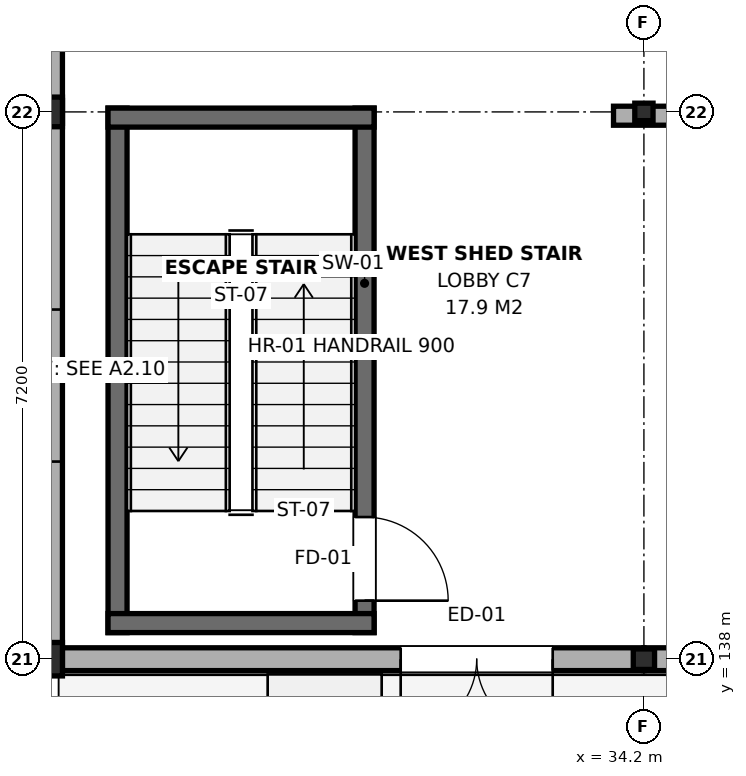
"""IFC4 building model, lengths in metres.
Left out: names, types, materials, properties, quantities, classifications, styles, units other than length and angle.
Written with IfcOpenShell. Run it as: python <this file> out.ifc"""

import sys

from ifc_helpers import new_model, si_unit, direction, frame, frame_2d, origin, origin_2d, place, context, subcontext, project, spatial, rectangle, i_section, extrude, element, fill, save


model = new_model("IFC4")
c1 = context("Model", 3, precision=1e-05, world=origin(), true_north=direction((0.0, 1.0)))
c2 = subcontext(c1, "Body", "Model", "MODEL_VIEW")
j1 = project(units=[si_unit("LENGTHUNIT", "METRE"), si_unit("PLANEANGLEUNIT", "RADIAN")], contexts=[c1])
p1 = place(None, origin())
s1 = spatial("IfcSite", under=j1, at=p1, CompositionType="ELEMENT")
p2 = place(p1, origin())
s2 = spatial("IfcBuilding", under=s1, at=p2, CompositionType="ELEMENT")
p3 = place(p2, origin())
s3 = spatial("IfcBuildingStorey", under=s2, at=p3, CompositionType="ELEMENT", Elevation=0.0)
p4 = place(p3, frame((26.4, 138.0, 0.0), z_axis=(0.0, 0.0, 1.0), x_axis=(1.0, 0.0, 0.0)))
e1 = element("IfcColumn", 1, at=p4, inside=s3, PredefinedType="COLUMN", context=c2, shape_type="SweptSolid", body=[
    extrude(i_section(OverallWidth=0.3, OverallDepth=0.44, WebThickness=0.011, FlangeThickness=0.021, FilletRadius=0.027, at=origin_2d()), origin(), (0.0, 0.0, 1.0), 4.56),
])
p5 = place(p3, frame((26.4, 145.2, 0.0), z_axis=(0.0, 0.0, 1.0), x_axis=(1.0, 0.0, 0.0)))
e2 = element("IfcColumn", 2, at=p5, inside=s3, PredefinedType="COLUMN", context=c2, shape_type="SweptSolid", body=[
    extrude(i_section(OverallWidth=0.3, OverallDepth=0.39, WebThickness=0.011, FlangeThickness=0.019, FilletRadius=0.027, at=origin_2d()), origin(), (0.0, 0.0, 1.0), 4.56),
])
p6 = place(p3, frame((34.2, 138.0, 0.0), z_axis=(0.0, 0.0, 1.0), x_axis=(1.0, 0.0, 0.0)))
e3 = element("IfcColumn", 3, at=p6, inside=s3, PredefinedType="COLUMN", context=c2, shape_type="SweptSolid", body=[
    extrude(i_section(OverallWidth=0.28, OverallDepth=0.27, WebThickness=0.008, FlangeThickness=0.013, FilletRadius=0.024, at=origin_2d()), origin(), (0.0, 0.0, 1.0), 4.56),
])
p7 = place(p3, frame((34.2, 145.2, 0.0), z_axis=(0.0, 0.0, 1.0), x_axis=(1.0, 0.0, 0.0)))
e4 = element("IfcColumn", 4, at=p7, inside=s3, PredefinedType="COLUMN", context=c2, shape_type="SweptSolid", body=[
    extrude(i_section(OverallWidth=0.24, OverallDepth=0.23, WebThickness=0.008, FlangeThickness=0.012, FilletRadius=0.021, at=origin_2d()), origin(), (0.0, 0.0, 1.0), 4.56),
])
p8 = place(p3, frame((26.25, 138.0, 0.0), z_axis=(0.0, 0.0, 1.0), x_axis=(1.0, 0.0, 0.0)))
e5 = element("IfcWall", 5, at=p8, inside=s3, PredefinedType="SOLIDWALL", context=c2, shape_type="SweptSolid", body=[
    extrude(rectangle(XDim=7.95, YDim=0.3, at=frame_2d((3.975, 0.0))), origin(), (0.0, 0.0, 1.0), 3.955),
])
p9 = place(p8, frame((4.75, 0.0, 0.0)))
e6 = element("IfcOpeningElement", 6, at=p9, cuts=e5, PredefinedType="OPENING", context=c2, shape_type="SweptSolid", body=[
    extrude(rectangle(XDim=2.0, YDim=2.25, at=frame_2d((1.0, 1.125))), frame((0.0, 0.165, 0.0), z_axis=(0.0, -1.0, 0.0), x_axis=(1.0, 0.0, 0.0)), (0.0, 0.0, 1.0), 0.33),
])
p10 = place(p3, frame((34.2, 138.0, 0.0), z_axis=(0.0, 0.0, 1.0), x_axis=(1.0, 0.0, 0.0)))
e7 = element("IfcWall", 7, at=p10, inside=s3, PredefinedType="SOLIDWALL", context=c2, shape_type="SweptSolid", body=[
    extrude(rectangle(XDim=6.0, YDim=0.3, at=frame_2d((3.0, 0.0))), origin(), (0.0, 0.0, 1.0), 3.955),
])
p11 = place(p10, frame((2.1, 0.0, 2.15)))
e8 = element("IfcOpeningElement", 8, at=p11, cuts=e7, PredefinedType="OPENING", context=c2, shape_type="SweptSolid", body=[
    extrude(rectangle(XDim=1.8, YDim=1.2, at=frame_2d((0.9, 0.6))), frame((0.0, 0.165, 0.0), z_axis=(0.0, -1.0, 0.0), x_axis=(1.0, 0.0, 0.0)), (0.0, 0.0, 1.0), 0.33),
])
p12 = place(p3, frame((26.4, 137.85, 0.0), z_axis=(0.0, 0.0, 1.0), x_axis=(0.0, 1.0, 0.0)))
e9 = element("IfcWall", 9, at=p12, inside=s3, PredefinedType="SOLIDWALL", context=c2, shape_type="SweptSolid", body=[
    extrude(rectangle(XDim=7.5, YDim=0.3, at=frame_2d((3.75, 0.0))), origin(), (0.0, 0.0, 1.0), 4.005),
])
p13 = place(p12, frame((2.75, 0.0, 1.1)))
e10 = element("IfcOpeningElement", 10, at=p13, cuts=e9, PredefinedType="OPENING", context=c2, shape_type="SweptSolid", body=[
    extrude(rectangle(XDim=2.0, YDim=1.8, at=frame_2d((1.0, 0.9))), frame((0.0, 0.165, 0.0), z_axis=(0.0, -1.0, 0.0), x_axis=(1.0, 0.0, 0.0)), (0.0, 0.0, 1.0), 0.33),
])
p14 = place(p3, frame((26.4, 145.05, 0.0), z_axis=(0.0, 0.0, 1.0), x_axis=(0.0, 1.0, 0.0)))
e11 = element("IfcWall", 11, at=p14, inside=s3, PredefinedType="SOLIDWALL", context=c2, shape_type="SweptSolid", body=[
    extrude(rectangle(XDim=7.35, YDim=0.3, at=frame_2d((3.675, 0.0))), origin(), (0.0, 0.0, 1.0), 4.005),
])
p15 = place(p14, frame((2.675, 0.0, 1.1)))
e12 = element("IfcOpeningElement", 12, at=p15, cuts=e11, PredefinedType="OPENING", context=c2, shape_type="SweptSolid", body=[
    extrude(rectangle(XDim=2.0, YDim=1.8, at=frame_2d((1.0, 0.9))), frame((0.0, 0.165, 0.0), z_axis=(0.0, -1.0, 0.0), x_axis=(1.0, 0.0, 0.0)), (0.0, 0.0, 1.0), 0.33),
])
p16 = place(p3, frame((27.275, 138.35, 0.0), z_axis=(0.0, 0.0, 1.0), x_axis=(0.0, 1.0, 0.0)))
e13 = element("IfcWall", 13, at=p16, inside=s3, PredefinedType="SHEAR", context=c2, shape_type="SweptSolid", body=[
    extrude(rectangle(XDim=6.9, YDim=0.25, at=frame_2d((3.45, 0.0))), origin(), (0.0, 0.0, 1.0), 4.56),
])
p17 = place(p3, frame((30.525, 138.35, 0.0), z_axis=(0.0, 0.0, 1.0), x_axis=(0.0, 1.0, 0.0)))
e14 = element("IfcWall", 14, at=p17, inside=s3, PredefinedType="SHEAR", context=c2, shape_type="SweptSolid", body=[
    extrude(rectangle(XDim=6.9, YDim=0.25, at=frame_2d((3.45, 0.0))), origin(), (0.0, 0.0, 1.0), 4.56),
])
p18 = place(p17, frame((0.42, 0.0, 0.0)))
e15 = element("IfcOpeningElement", 15, at=p18, cuts=e14, PredefinedType="OPENING", context=c2, shape_type="SweptSolid", body=[
    extrude(rectangle(XDim=1.1, YDim=2.15, at=frame_2d((0.55, 1.075))), frame((0.0, 0.14, 0.0), z_axis=(0.0, -1.0, 0.0), x_axis=(1.0, 0.0, 0.0)), (0.0, 0.0, 1.0), 0.28),
])
for number, where, z_axis, x_axis in (
    (16, (27.15, 138.475, 0.0), (0.0, 0.0, 1.0), (1.0, 0.0, 0.0)),
    (17, (27.15, 145.125, 0.0), (0.0, 0.0, 1.0), (1.0, 0.0, 0.0)),
):
    element("IfcWall", number, at=place(p3, frame(where, z_axis=z_axis, x_axis=x_axis)), inside=s3, PredefinedType="SHEAR", context=c2, shape_type="SweptSolid", body=[
        extrude(rectangle(XDim=3.5, YDim=0.25, at=frame_2d((1.75, 0.0))), origin(), (0.0, 0.0, 1.0), 4.56),
    ])
p19 = place(p3, frame((33.8, 145.15, 0.0), z_axis=(0.0, 0.0, 1.0), x_axis=(1.0, 0.0, 0.0)))
e18 = element("IfcWall", 18, at=p19, inside=s3, PredefinedType="PARTITIONING", context=c2, shape_type="SweptSolid", body=[
    extrude(rectangle(XDim=27.6, YDim=0.25, at=frame_2d((13.8, 0.0))), origin(), (0.0, 0.0, 1.0), 3.955),
])
p20 = place(p19, frame((8.65, 0.0, 0.0)))
e19 = element("IfcOpeningElement", 19, at=p20, cuts=e18, PredefinedType="OPENING", context=c2, shape_type="SweptSolid", body=[
    extrude(rectangle(XDim=1.5, YDim=2.15, at=frame_2d((0.75, 1.075))), frame((0.0, 0.14, 0.0), z_axis=(0.0, -1.0, 0.0), x_axis=(1.0, 0.0, 0.0)), (0.0, 0.0, 1.0), 0.28),
])
p21 = place(p19, frame((20.65, 0.0, 0.0)))
e20 = element("IfcOpeningElement", 20, at=p21, cuts=e18, PredefinedType="OPENING", context=c2, shape_type="SweptSolid", body=[
    extrude(rectangle(XDim=1.5, YDim=2.15, at=frame_2d((0.75, 1.075))), frame((0.0, 0.14, 0.0), z_axis=(0.0, -1.0, 0.0), x_axis=(1.0, 0.0, 0.0)), (0.0, 0.0, 1.0), 0.28),
])
p22 = place(p9, frame((2.0, 0.0, 0.0), z_axis=(0.0, 0.0, 1.0), x_axis=(-1.0, 0.0, 0.0)))
e21 = element("IfcDoor", 21, at=p22, inside=s3, OperationType="DOUBLE_DOOR_SINGLE_SWING", PredefinedType="DOOR", context=c2, shape_type="SweptSolid", body=[
    extrude(rectangle(XDim=2.0, YDim=2.25, at=frame_2d((1.0, 1.125))), frame((0.0, 0.025, 0.0), z_axis=(0.0, -1.0, 0.0), x_axis=(1.0, 0.0, 0.0)), (0.0, 0.0, 1.0), 0.05),
])
fill(e6, e21)
p23 = place(p13, origin())
e22 = element("IfcWindow", 22, at=p23, inside=s3, PartitioningType="SINGLE_PANEL", PredefinedType="WINDOW", context=c2, shape_type="SweptSolid", body=[
    extrude(rectangle(XDim=2.0, YDim=1.8, at=frame_2d((1.0, 0.9))), frame((0.0, 0.03, 0.0), z_axis=(0.0, -1.0, 0.0), x_axis=(1.0, 0.0, 0.0)), (0.0, 0.0, 1.0), 0.06),
])
fill(e10, e22)
p24 = place(p18, frame((1.1, 0.0, 0.0), z_axis=(0.0, 0.0, 1.0), x_axis=(-1.0, 0.0, 0.0)))
e23 = element("IfcDoor", 23, at=p24, inside=s3, OperationType="SINGLE_SWING_RIGHT", PredefinedType="DOOR", context=c2, shape_type="SweptSolid", body=[
    extrude(rectangle(XDim=1.1, YDim=2.15, at=frame_2d((0.55, 1.075))), frame((0.0, 0.025, 0.0), z_axis=(0.0, -1.0, 0.0), x_axis=(1.0, 0.0, 0.0)), (0.0, 0.0, 1.0), 0.05),
])
fill(e15, e23)
save(model, sys.argv[1])
